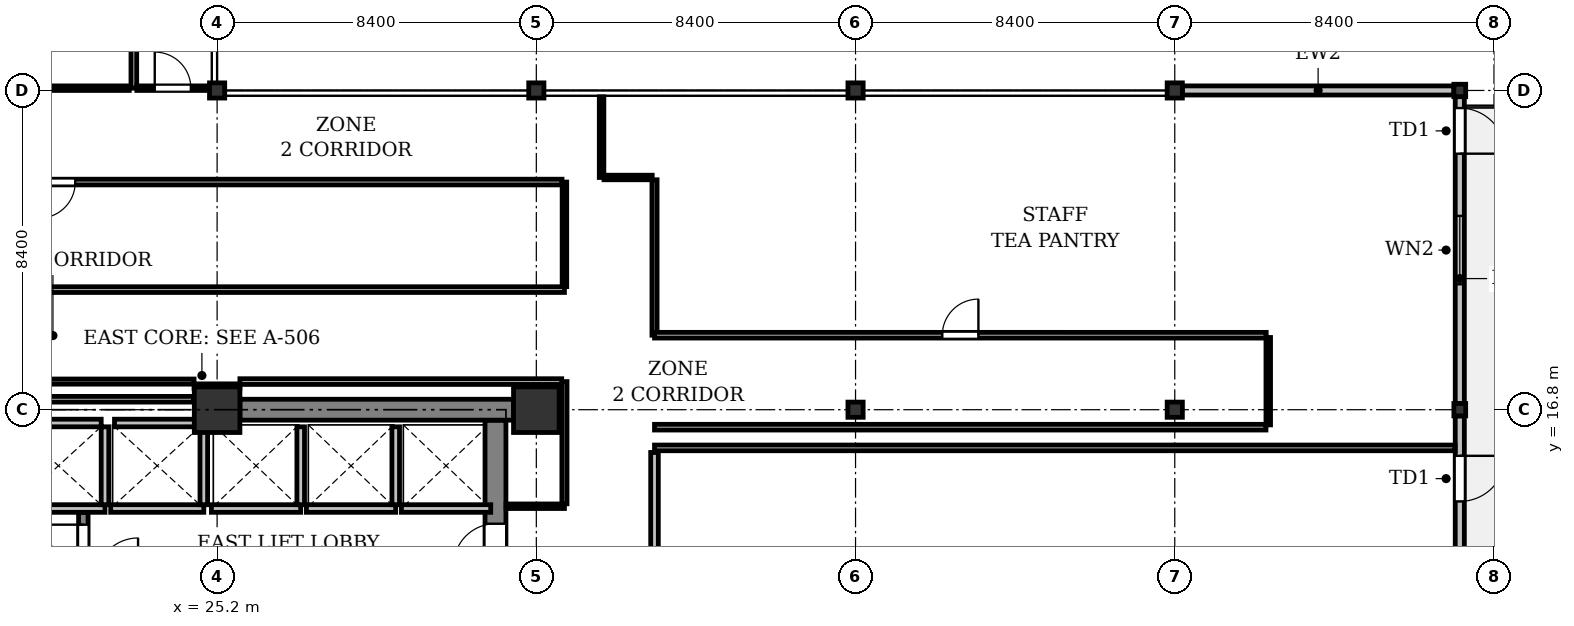
"""IFC4 building model, lengths in metres.
Left out: names, types, materials, properties, quantities, classifications, styles, units other than length and angle.
Written with IfcOpenShell. Run it as: python <this file> out.ifc"""

import sys

from ifc_helpers import new_model, si_unit, direction, frame, frame_2d, origin, origin_2d, place, context, subcontext, project, spatial, rectangle, i_section, extrude, element, fill, save


model = new_model("IFC4")
c1 = context("Model", 3, precision=1e-05, world=origin(), true_north=direction((0.0, 1.0)))
c2 = subcontext(c1, "Body", "Model", "MODEL_VIEW")
j1 = project(units=[si_unit("LENGTHUNIT", "METRE"), si_unit("PLANEANGLEUNIT", "RADIAN")], contexts=[c1])
p1 = place(None, origin())
s1 = spatial("IfcSite", under=j1, at=p1, CompositionType="ELEMENT")
p2 = place(p1, origin())
s2 = spatial("IfcBuilding", under=s1, at=p2, CompositionType="ELEMENT")
p3 = place(p2, frame((0.0, 0.0, 109.0)))
s3 = spatial("IfcBuildingStorey", under=s2, at=p3, CompositionType="ELEMENT", Elevation=109.0)
p4 = place(p3, frame((25.2, 16.8, 0.0), z_axis=(0.0, 0.0, 1.0), x_axis=(1.0, 0.0, 0.0)))
e1 = element("IfcColumn", 1, at=p4, inside=s3, PredefinedType="COLUMN", context=c2, shape_type="SweptSolid", body=[
    extrude(rectangle(XDim=1.2, YDim=1.2, at=origin_2d()), origin(), (0.0, 0.0, 1.0), 4.1),
])
p5 = place(p3, frame((25.2, 25.2, 0.0), z_axis=(0.0, 0.0, 1.0), x_axis=(1.0, 0.0, 0.0)))
e2 = element("IfcColumn", 2, at=p5, inside=s3, PredefinedType="COLUMN", context=c2, shape_type="SweptSolid", body=[
    extrude(i_section(OverallWidth=0.4, OverallDepth=0.4, WebThickness=0.025, FlangeThickness=0.04, at=origin_2d()), origin(), (0.0, 0.0, 1.0), 4.1),
])
p6 = place(p3, frame((33.6, 16.8, 0.0), z_axis=(0.0, 0.0, 1.0), x_axis=(1.0, 0.0, 0.0)))
e3 = element("IfcColumn", 3, at=p6, inside=s3, PredefinedType="COLUMN", context=c2, shape_type="SweptSolid", body=[
    extrude(rectangle(XDim=1.2, YDim=1.2, at=origin_2d()), origin(), (0.0, 0.0, 1.0), 4.1),
])
for number, where, z_axis, x_axis in (
    (4, (33.6, 25.2, 0.0), (0.0, 0.0, 1.0), (1.0, 0.0, 0.0)),
    (5, (42.0, 16.8, 0.0), (0.0, 0.0, 1.0), (1.0, 0.0, 0.0)),
    (6, (42.0, 25.2, 0.0), (0.0, 0.0, 1.0), (1.0, 0.0, 0.0)),
    (7, (50.4, 16.8, 0.0), (0.0, 0.0, 1.0), (1.0, 0.0, 0.0)),
    (8, (50.4, 25.2, 0.0), (0.0, 0.0, 1.0), (1.0, 0.0, 0.0)),
):
    element("IfcColumn", number, at=place(p3, frame(where, z_axis=z_axis, x_axis=x_axis)), inside=s3, PredefinedType="COLUMN", context=c2, shape_type="SweptSolid", body=[
        extrude(i_section(OverallWidth=0.4, OverallDepth=0.4, WebThickness=0.025, FlangeThickness=0.04, at=origin_2d()), origin(), (0.0, 0.0, 1.0), 4.1),
    ])
for number, where, z_axis, x_axis in (
    (9, (57.9, 16.8, 0.0), (0.0, 0.0, 1.0), (1.0, 0.0, 0.0)),
    (10, (57.9, 25.2, 0.0), (0.0, 0.0, 1.0), (1.0, 0.0, 0.0)),
):
    element("IfcColumn", number, at=place(p3, frame(where, z_axis=z_axis, x_axis=x_axis)), inside=s3, PredefinedType="COLUMN", context=c2, shape_type="SweptSolid", body=[
        extrude(i_section(OverallWidth=0.311, OverallDepth=0.327, WebThickness=0.016, FlangeThickness=0.025, FilletRadius=0.017, at=origin_2d()), origin(), (0.0, 0.0, 1.0), 4.1),
    ])
p7 = place(p3, frame((57.9, 25.037, 0.0), z_axis=(0.0, 0.0, 1.0), x_axis=(0.0, -1.0, 0.0)))
e11 = element("IfcWall", 11, at=p7, inside=s3, PredefinedType="STANDARD", context=c2, shape_type="SweptSolid", body=[
    extrude(rectangle(XDim=8.073, YDim=0.24, at=frame_2d((4.037, 0.0))), origin(), (0.0, 0.0, 1.0), 3.347),
])
p8 = place(p7, frame((0.3, 0.0, 0.0)))
e12 = element("IfcOpeningElement", 12, at=p8, cuts=e11, PredefinedType="OPENING", context=c2, shape_type="SweptSolid", body=[
    extrude(rectangle(XDim=1.2, YDim=2.2, at=frame_2d((0.6, 1.1))), frame((0.0, 0.13, 0.0), z_axis=(0.0, -1.0, 0.0), x_axis=(1.0, 0.0, 0.0)), (0.0, 0.0, 1.0), 0.26),
])
p9 = place(p7, frame((3.136, 0.0, 0.9)))
e13 = element("IfcOpeningElement", 13, at=p9, cuts=e11, PredefinedType="OPENING", context=c2, shape_type="SweptSolid", body=[
    extrude(rectangle(XDim=1.8, YDim=1.6, at=frame_2d((0.9, 0.8))), frame((0.0, 0.13, 0.0), z_axis=(0.0, -1.0, 0.0), x_axis=(1.0, 0.0, 0.0)), (0.0, 0.0, 1.0), 0.26),
])
p10 = place(p3, frame((57.9, 16.636, 0.0), z_axis=(0.0, 0.0, 1.0), x_axis=(0.0, -1.0, 0.0)))
e14 = element("IfcWall", 14, at=p10, inside=s3, PredefinedType="STANDARD", context=c2, shape_type="SweptSolid", body=[
    extrude(rectangle(XDim=8.073, YDim=0.24, at=frame_2d((4.037, 0.0))), origin(), (0.0, 0.0, 1.0), 3.347),
])
p11 = place(p10, frame((1.05, 0.0, 0.0)))
e15 = element("IfcOpeningElement", 15, at=p11, cuts=e14, PredefinedType="OPENING", context=c2, shape_type="SweptSolid", body=[
    extrude(rectangle(XDim=1.2, YDim=2.2, at=frame_2d((0.6, 1.1))), frame((0.0, 0.13, 0.0), z_axis=(0.0, -1.0, 0.0), x_axis=(1.0, 0.0, 0.0)), (0.0, 0.0, 1.0), 0.26),
])
p12 = place(p10, frame((3.722, 0.0, 0.9)))
e16 = element("IfcOpeningElement", 16, at=p12, cuts=e14, PredefinedType="OPENING", context=c2, shape_type="SweptSolid", body=[
    extrude(rectangle(XDim=1.5, YDim=1.6, at=frame_2d((0.75, 0.8))), frame((0.0, 0.13, 0.0), z_axis=(0.0, -1.0, 0.0), x_axis=(1.0, 0.0, 0.0)), (0.0, 0.0, 1.0), 0.26),
])
p13 = place(p3, frame((50.6, 25.2, 0.0), z_axis=(0.0, 0.0, 1.0), x_axis=(1.0, 0.0, 0.0)))
e17 = element("IfcWall", 17, at=p13, inside=s3, PredefinedType="STANDARD", context=c2, shape_type="SweptSolid", body=[
    extrude(rectangle(XDim=7.144, YDim=0.24, at=frame_2d((3.572, 0.0))), origin(), (0.0, 0.0, 1.0), 2.84),
])
p14 = place(p3, frame((32.525, 8.675, 0.0), z_axis=(0.0, 0.0, 1.0), x_axis=(0.0, 1.0, 0.0)))
e18 = element("IfcWall", 18, at=p14, inside=s3, PredefinedType="SHEAR", context=c2, shape_type="SweptSolid", body=[
    extrude(rectangle(XDim=7.85, YDim=0.55, at=frame_2d((3.925, 0.0))), origin(), (0.0, 0.0, 1.0), 3.75),
])
p15 = place(p14, frame((4.025, 0.0, 0.0)))
e19 = element("IfcOpeningElement", 19, at=p15, cuts=e18, PredefinedType="OPENING", context=c2, shape_type="SweptSolid", body=[
    extrude(rectangle(XDim=1.1, YDim=2.15, at=frame_2d((0.55, 1.075))), frame((0.0, 0.285, 0.0), z_axis=(0.0, -1.0, 0.0), x_axis=(1.0, 0.0, 0.0)), (0.0, 0.0, 1.0), 0.57),
])
p16 = place(p3, frame((25.8, 16.8, 0.0), z_axis=(0.0, 0.0, 1.0), x_axis=(1.0, 0.0, 0.0)))
e20 = element("IfcWall", 20, at=p16, inside=s3, PredefinedType="SHEAR", context=c2, shape_type="SweptSolid", body=[
    extrude(rectangle(XDim=7.2, YDim=0.55, at=frame_2d((3.6, 0.0))), origin(), (0.0, 0.0, 1.0), 3.75),
])
p17 = place(p3, frame((21.68, 12.45, 0.0), z_axis=(0.0, 0.0, 1.0), x_axis=(0.0, 1.0, 0.0)))
e21 = element("IfcWall", 21, at=p17, inside=s3, PredefinedType="SHEAR", context=c2, shape_type="SweptSolid", body=[
    extrude(rectangle(XDim=1.65, YDim=0.25, at=frame_2d((0.825, 0.0))), origin(), (0.0, 0.0, 1.0), 3.75),
])
p18 = place(p17, frame((0.325, 0.0, 0.0)))
e22 = element("IfcOpeningElement", 22, at=p18, cuts=e21, PredefinedType="OPENING", context=c2, shape_type="SweptSolid", body=[
    extrude(rectangle(XDim=1.0, YDim=2.15, at=frame_2d((0.5, 1.075))), frame((0.0, 0.135, 0.0), z_axis=(0.0, -1.0, 0.0), x_axis=(1.0, 0.0, 0.0)), (0.0, 0.0, 1.0), 0.27),
])
p19 = place(p3, frame((19.8, 14.2, 0.0), z_axis=(0.0, 0.0, 1.0), x_axis=(1.0, 0.0, 0.0)))
e23 = element("IfcWall", 23, at=p19, inside=s3, PredefinedType="PARTITIONING", context=c2, shape_type="SweptSolid", body=[
    extrude(rectangle(XDim=2.45, YDim=0.2, at=frame_2d((1.225, 0.0))), origin(), (0.0, 0.0, 1.0), 3.75),
])
p20 = place(p3, frame((22.25, 14.3, 0.0), z_axis=(0.0, 0.0, 1.0), x_axis=(0.0, 1.0, 0.0)))
e24 = element("IfcWall", 24, at=p20, inside=s3, PredefinedType="PARTITIONING", context=c2, shape_type="SweptSolid", body=[
    extrude(rectangle(XDim=2.05, YDim=0.2, at=frame_2d((1.025, 0.0))), origin(), (0.0, 0.0, 1.0), 3.75),
])
p21 = place(p3, frame((19.9, 16.45, 0.0), z_axis=(0.0, 0.0, 1.0), x_axis=(1.0, 0.0, 0.0)))
e25 = element("IfcWall", 25, at=p21, inside=s3, PredefinedType="PARTITIONING", context=c2, shape_type="SweptSolid", body=[
    extrude(rectangle(XDim=2.25, YDim=0.2, at=frame_2d((1.125, 0.0))), origin(), (0.0, 0.0, 1.0), 3.75),
])
p22 = place(p3, frame((22.4, 14.2, 0.0), z_axis=(0.0, 0.0, 1.0), x_axis=(1.0, 0.0, 0.0)))
e26 = element("IfcWall", 26, at=p22, inside=s3, PredefinedType="PARTITIONING", context=c2, shape_type="SweptSolid", body=[
    extrude(rectangle(XDim=2.45, YDim=0.2, at=frame_2d((1.225, 0.0))), origin(), (0.0, 0.0, 1.0), 3.75),
])
p23 = place(p3, frame((24.85, 14.3, 0.0), z_axis=(0.0, 0.0, 1.0), x_axis=(0.0, 1.0, 0.0)))
e27 = element("IfcWall", 27, at=p23, inside=s3, PredefinedType="PARTITIONING", context=c2, shape_type="SweptSolid", body=[
    extrude(rectangle(XDim=2.05, YDim=0.2, at=frame_2d((1.025, 0.0))), origin(), (0.0, 0.0, 1.0), 3.75),
])
p24 = place(p3, frame((22.5, 16.45, 0.0), z_axis=(0.0, 0.0, 1.0), x_axis=(1.0, 0.0, 0.0)))
e28 = element("IfcWall", 28, at=p24, inside=s3, PredefinedType="PARTITIONING", context=c2, shape_type="SweptSolid", body=[
    extrude(rectangle(XDim=2.25, YDim=0.2, at=frame_2d((1.125, 0.0))), origin(), (0.0, 0.0, 1.0), 3.75),
])
p25 = place(p3, frame((25.05, 14.2, 0.0), z_axis=(0.0, 0.0, 1.0), x_axis=(1.0, 0.0, 0.0)))
e29 = element("IfcWall", 29, at=p25, inside=s3, PredefinedType="PARTITIONING", context=c2, shape_type="SweptSolid", body=[
    extrude(rectangle(XDim=2.35, YDim=0.2, at=frame_2d((1.175, 0.0))), origin(), (0.0, 0.0, 1.0), 3.75),
])
p26 = place(p3, frame((27.4, 14.3, 0.0), z_axis=(0.0, 0.0, 1.0), x_axis=(0.0, 1.0, 0.0)))
e30 = element("IfcWall", 30, at=p26, inside=s3, PredefinedType="PARTITIONING", context=c2, shape_type="SweptSolid", body=[
    extrude(rectangle(XDim=2.05, YDim=0.2, at=frame_2d((1.025, 0.0))), origin(), (0.0, 0.0, 1.0), 3.75),
])
p27 = place(p3, frame((27.55, 14.2, 0.0), z_axis=(0.0, 0.0, 1.0), x_axis=(1.0, 0.0, 0.0)))
e31 = element("IfcWall", 31, at=p27, inside=s3, PredefinedType="PARTITIONING", context=c2, shape_type="SweptSolid", body=[
    extrude(rectangle(XDim=2.35, YDim=0.2, at=frame_2d((1.175, 0.0))), origin(), (0.0, 0.0, 1.0), 3.75),
])
p28 = place(p3, frame((29.9, 14.3, 0.0), z_axis=(0.0, 0.0, 1.0), x_axis=(0.0, 1.0, 0.0)))
e32 = element("IfcWall", 32, at=p28, inside=s3, PredefinedType="PARTITIONING", context=c2, shape_type="SweptSolid", body=[
    extrude(rectangle(XDim=2.05, YDim=0.2, at=frame_2d((1.025, 0.0))), origin(), (0.0, 0.0, 1.0), 3.75),
])
p29 = place(p3, frame((30.05, 14.2, 0.0), z_axis=(0.0, 0.0, 1.0), x_axis=(1.0, 0.0, 0.0)))
e33 = element("IfcWall", 33, at=p29, inside=s3, PredefinedType="PARTITIONING", context=c2, shape_type="SweptSolid", body=[
    extrude(rectangle(XDim=2.35, YDim=0.2, at=frame_2d((1.175, 0.0))), origin(), (0.0, 0.0, 1.0), 3.75),
])
p30 = place(p3, frame((23.009, 46.031, 0.0), z_axis=(0.0, 0.0, 1.0), x_axis=(0.0, -1.0, 0.0)))
e34 = element("IfcWall", 34, at=p30, inside=s3, PredefinedType="PARTITIONING", context=c2, shape_type="SweptSolid", body=[
    extrude(rectangle(XDim=20.771, YDim=0.15, at=frame_2d((10.385, 0.0))), origin(), (0.0, 0.0, 1.0), 3.217),
])
p31 = place(p3, frame((23.088, 25.26, 0.0), z_axis=(0.0, 0.0, 1.0), x_axis=(1.0, 0.0, 0.0)))
e35 = element("IfcWall", 35, at=p31, inside=s3, PredefinedType="PARTITIONING", context=c2, shape_type="SweptSolid", body=[
    extrude(rectangle(XDim=1.892, YDim=0.12, at=frame_2d((0.946, 0.0))), origin(), (0.0, 0.0, 1.0), 3.217),
])
p32 = place(p31, frame((0.471, 0.0, 0.0)))
e36 = element("IfcOpeningElement", 36, at=p32, cuts=e35, PredefinedType="OPENING", context=c2, shape_type="SweptSolid", body=[
    extrude(rectangle(XDim=0.95, YDim=2.15, at=frame_2d((0.475, 1.075))), frame((0.0, 0.07, 0.0), z_axis=(0.0, -1.0, 0.0), x_axis=(1.0, 0.0, 0.0)), (0.0, 0.0, 1.0), 0.14),
])
p33 = place(p3, frame((52.8, 16.34, 0.0), z_axis=(0.0, 0.0, 1.0), x_axis=(-1.0, 0.0, 0.0)))
e37 = element("IfcWall", 37, at=p33, inside=s3, PredefinedType="PARTITIONING", context=c2, shape_type="SweptSolid", body=[
    extrude(rectangle(XDim=16.09, YDim=0.15, at=frame_2d((8.045, 0.0))), origin(), (0.0, 0.0, 1.0), 3.222),
])
p34 = place(p3, frame((36.71, 15.795, 0.0), z_axis=(0.0, 0.0, 1.0), x_axis=(1.0, 0.0, 0.0)))
e38 = element("IfcWall", 38, at=p34, inside=s3, PredefinedType="PARTITIONING", context=c2, shape_type="SweptSolid", body=[
    extrude(rectangle(XDim=21.066, YDim=0.15, at=frame_2d((10.533, 0.0))), origin(), (0.0, 0.0, 1.0), 3.222),
])
p35 = place(p3, frame((35.317, 25.031, 0.0), z_axis=(0.0, 0.0, 1.0), x_axis=(0.0, -1.0, 0.0)))
e39 = element("IfcWall", 39, at=p35, inside=s3, PredefinedType="PARTITIONING", context=c2, shape_type="SweptSolid", body=[
    extrude(rectangle(XDim=2.121, YDim=0.12, at=frame_2d((1.061, 0.0))), origin(), (0.0, 0.0, 1.0), 3.75),
])
p36 = place(p3, frame((35.381, 22.91, 0.0), z_axis=(0.0, 0.0, 1.0), x_axis=(1.0, 0.0, 0.0)))
e40 = element("IfcWall", 40, at=p36, inside=s3, PredefinedType="PARTITIONING", context=c2, shape_type="SweptSolid", body=[
    extrude(rectangle(XDim=1.269, YDim=0.12, at=frame_2d((0.634, 0.0))), origin(), (0.0, 0.0, 1.0), 3.75),
])
p37 = place(p3, frame((36.71, 22.85, 0.0), z_axis=(0.0, 0.0, 1.0), x_axis=(0.0, -1.0, 0.0)))
e41 = element("IfcWall", 41, at=p37, inside=s3, PredefinedType="PARTITIONING", context=c2, shape_type="SweptSolid", body=[
    extrude(rectangle(XDim=4.09, YDim=0.135, at=frame_2d((2.045, 0.0))), origin(), (0.0, 0.0, 1.0), 3.75),
])
p38 = place(p3, frame((36.71, 18.76, 0.0), z_axis=(0.0, 0.0, 1.0), x_axis=(0.999999999885, -1.5167832e-05, 0.0)))
e42 = element("IfcWall", 42, at=p38, inside=s3, PredefinedType="PARTITIONING", context=c2, shape_type="SweptSolid", body=[
    extrude(rectangle(XDim=16.096, YDim=0.15, at=frame_2d((8.048, 0.0))), origin(), (0.0, 0.0, 1.0), 3.222),
])
p39 = place(p38, frame((7.573, 0.0, 0.0)))
e43 = element("IfcOpeningElement", 43, at=p39, cuts=e42, PredefinedType="OPENING", context=c2, shape_type="SweptSolid", body=[
    extrude(rectangle(XDim=0.95, YDim=2.15, at=frame_2d((0.475, 1.075))), frame((0.0, 0.085, 0.0), z_axis=(0.0, -1.0, 0.0), x_axis=(1.0, 0.0, 0.0)), (0.0, 0.0, 1.0), 0.17),
])
p40 = place(p3, frame((52.86, 18.7, 0.0), z_axis=(0.0, 0.0, 1.0), x_axis=(0.0, -1.0, 0.0)))
e44 = element("IfcWall", 44, at=p40, inside=s3, PredefinedType="PARTITIONING", context=c2, shape_type="SweptSolid", body=[
    extrude(rectangle(XDim=2.3, YDim=0.12, at=frame_2d((1.15, 0.0))), origin(), (0.0, 0.0, 1.0), 2.84),
])
p41 = place(p3, frame((17.42, 17.075, 0.0), z_axis=(0.0, 0.0, 1.0), x_axis=(1.0, 0.0, 0.0)))
e45 = element("IfcWall", 45, at=p41, inside=s3, PredefinedType="PARTITIONING", context=c2, shape_type="SweptSolid", body=[
    extrude(rectangle(XDim=7.16, YDim=0.15, at=frame_2d((3.58, 0.0))), origin(), (0.0, 0.0, 1.0), 3.394),
])
p42 = place(p3, frame((24.594, 17.419, 0.0), z_axis=(0.0, 0.0, 1.0), x_axis=(0.999999815526, 0.000607410295, 0.0)))
e46 = element("IfcWall", 46, at=p42, inside=s3, PredefinedType="PARTITIONING", context=c2, shape_type="SweptSolid", body=[
    extrude(rectangle(XDim=1.206, YDim=0.12, at=frame_2d((0.603, 0.0))), origin(), (0.0, 0.0, 1.0), 3.222),
])
p43 = place(p3, frame((32.804, 14.26, 0.0), z_axis=(0.0, 0.0, 1.0), x_axis=(1.0, 0.0, 0.0)))
e47 = element("IfcWall", 47, at=p43, inside=s3, PredefinedType="PARTITIONING", context=c2, shape_type="SweptSolid", body=[
    extrude(rectangle(XDim=1.536, YDim=0.12, at=frame_2d((0.768, 0.0))), origin(), (0.0, 0.0, 1.0), 3.222),
])
p44 = place(p3, frame((34.34, 14.324, 0.0), z_axis=(0.0, 0.0, 1.0), x_axis=(0.0, 1.0, 0.0)))
e48 = element("IfcWall", 48, at=p44, inside=s3, PredefinedType="PARTITIONING", context=c2, shape_type="SweptSolid", body=[
    extrude(rectangle(XDim=3.216, YDim=0.135, at=frame_2d((1.608, 0.0))), origin(), (0.0, 0.0, 1.0), 3.217),
])
p45 = place(p3, frame((34.269, 17.54, 0.0), z_axis=(0.0, 0.0, 1.0), x_axis=(-1.0, 0.0, 0.0)))
e49 = element("IfcWall", 49, at=p45, inside=s3, PredefinedType="PARTITIONING", context=c2, shape_type="SweptSolid", body=[
    extrude(rectangle(XDim=8.469, YDim=0.15, at=frame_2d((4.234, 0.0))), origin(), (0.0, 0.0, 1.0), 3.222),
])
p46 = place(p3, frame((24.594, 17.54, 0.0), z_axis=(0.0, 0.0, 1.0), x_axis=(-1.0, 0.0, 0.0)))
e50 = element("IfcWall", 50, at=p46, inside=s3, PredefinedType="PARTITIONING", context=c2, shape_type="SweptSolid", body=[
    extrude(rectangle(XDim=4.694, YDim=0.135, at=frame_2d((2.347, 0.0))), origin(), (0.0, 0.0, 1.0), 3.394),
])
p47 = place(p3, frame((19.9, 19.96, 0.0), z_axis=(0.0, 0.0, 1.0), x_axis=(1.0, 0.0, 0.0)))
e51 = element("IfcWall", 51, at=p47, inside=s3, PredefinedType="PARTITIONING", context=c2, shape_type="SweptSolid", body=[
    extrude(rectangle(XDim=14.44, YDim=0.15, at=frame_2d((7.22, 0.0))), origin(), (0.0, 0.0, 1.0), 3.222),
])
p48 = place(p3, frame((34.34, 20.039, 0.0), z_axis=(0.0, 0.0, 1.0), x_axis=(0.0, 1.0, 0.0)))
e52 = element("IfcWall", 52, at=p48, inside=s3, PredefinedType="PARTITIONING", context=c2, shape_type="SweptSolid", body=[
    extrude(rectangle(XDim=2.751, YDim=0.12, at=frame_2d((1.375, 0.0))), origin(), (0.0, 0.0, 1.0), 3.75),
])
p49 = place(p3, frame((34.276, 22.79, 0.0), z_axis=(0.0, 0.0, 1.0), x_axis=(-1.0, 0.0, 0.0)))
e53 = element("IfcWall", 53, at=p49, inside=s3, PredefinedType="PARTITIONING", context=c2, shape_type="SweptSolid", body=[
    extrude(rectangle(XDim=26.566, YDim=0.15, at=frame_2d((13.283, 0.0))), origin(), (0.0, 0.0, 1.0), 3.222),
])
p50 = place(p49, frame((12.808, 0.0, 0.0)))
e54 = element("IfcOpeningElement", 54, at=p50, cuts=e53, PredefinedType="OPENING", context=c2, shape_type="SweptSolid", body=[
    extrude(rectangle(XDim=0.95, YDim=2.15, at=frame_2d((0.475, 1.075))), frame((0.0, 0.085, 0.0), z_axis=(0.0, -1.0, 0.0), x_axis=(1.0, 0.0, 0.0)), (0.0, 0.0, 1.0), 0.17),
])
p51 = place(p3, frame((36.71, 15.675, 0.0), z_axis=(0.0, 0.0, 1.0), x_axis=(0.0, -1.0, 0.0)))
e55 = element("IfcWall", 55, at=p51, inside=s3, PredefinedType="PARTITIONING", context=c2, shape_type="SweptSolid", body=[
    extrude(rectangle(XDim=7.965, YDim=0.2, at=frame_2d((3.982, 0.0))), origin(), (0.0, 0.0, 1.0), 3.217),
])
p52 = place(p51, frame((3.483, 0.0, 0.0)))
e56 = element("IfcOpeningElement", 56, at=p52, cuts=e55, PredefinedType="OPENING", context=c2, shape_type="SweptSolid", body=[
    extrude(rectangle(XDim=1.0, YDim=2.15, at=frame_2d((0.5, 1.075))), frame((0.0, 0.11, 0.0), z_axis=(0.0, -1.0, 0.0), x_axis=(1.0, 0.0, 0.0)), (0.0, 0.0, 1.0), 0.22),
])
p53 = place(p3, frame((20.039, 25.26, 0.0), z_axis=(0.0, 0.0, 1.0), x_axis=(1.0, 0.0, 0.0)))
e57 = element("IfcWall", 57, at=p53, inside=s3, PredefinedType="PARTITIONING", context=c2, shape_type="SweptSolid", body=[
    extrude(rectangle(XDim=2.85, YDim=0.12, at=frame_2d((1.425, 0.0))), origin(), (0.0, 0.0, 1.0), 3.217),
])
p54 = place(p8, origin())
e58 = element("IfcDoor", 58, at=p54, inside=s3, OperationType="SINGLE_SWING_RIGHT", PredefinedType="DOOR", context=c2, shape_type="SweptSolid", body=[
    extrude(rectangle(XDim=1.2, YDim=2.2, at=frame_2d((0.6, 1.1))), frame((0.0, 0.025, 0.0), z_axis=(0.0, -1.0, 0.0), x_axis=(1.0, 0.0, 0.0)), (0.0, 0.0, 1.0), 0.05),
])
fill(e12, e58)
p55 = place(p9, origin())
e59 = element("IfcWindow", 59, at=p55, inside=s3, PartitioningType="SINGLE_PANEL", PredefinedType="WINDOW", context=c2, shape_type="SweptSolid", body=[
    extrude(rectangle(XDim=1.8, YDim=1.6, at=frame_2d((0.9, 0.8))), frame((0.0, 0.03, 0.0), z_axis=(0.0, -1.0, 0.0), x_axis=(1.0, 0.0, 0.0)), (0.0, 0.0, 1.0), 0.06),
])
fill(e13, e59)
p56 = place(p11, origin())
e60 = element("IfcDoor", 60, at=p56, inside=s3, OperationType="SINGLE_SWING_LEFT", PredefinedType="DOOR", context=c2, shape_type="SweptSolid", body=[
    extrude(rectangle(XDim=1.2, YDim=2.2, at=frame_2d((0.6, 1.1))), frame((0.0, 0.025, 0.0), z_axis=(0.0, -1.0, 0.0), x_axis=(1.0, 0.0, 0.0)), (0.0, 0.0, 1.0), 0.05),
])
fill(e15, e60)
p57 = place(p15, origin())
e61 = element("IfcDoor", 61, at=p57, inside=s3, OperationType="SINGLE_SWING_LEFT", PredefinedType="DOOR", context=c2, shape_type="SweptSolid", body=[
    extrude(rectangle(XDim=1.1, YDim=2.15, at=frame_2d((0.55, 1.075))), frame((0.0, 0.025, 0.0), z_axis=(0.0, -1.0, 0.0), x_axis=(1.0, 0.0, 0.0)), (0.0, 0.0, 1.0), 0.05),
])
fill(e19, e61)
p58 = place(p18, origin())
e62 = element("IfcDoor", 62, at=p58, inside=s3, OperationType="SINGLE_SWING_RIGHT", PredefinedType="DOOR", context=c2, shape_type="SweptSolid", body=[
    extrude(rectangle(XDim=1.0, YDim=2.15, at=frame_2d((0.5, 1.075))), frame((0.0, 0.025, 0.0), z_axis=(0.0, -1.0, 0.0), x_axis=(1.0, 0.0, 0.0)), (0.0, 0.0, 1.0), 0.05),
])
fill(e22, e62)
p59 = place(p32, origin())
e63 = element("IfcDoor", 63, at=p59, inside=s3, OperationType="SINGLE_SWING_LEFT", PredefinedType="DOOR", context=c2, shape_type="SweptSolid", body=[
    extrude(rectangle(XDim=0.95, YDim=2.15, at=frame_2d((0.475, 1.075))), frame((0.0, 0.025, 0.0), z_axis=(0.0, -1.0, 0.0), x_axis=(1.0, 0.0, 0.0)), (0.0, 0.0, 1.0), 0.05),
])
fill(e36, e63)
p60 = place(p39, origin())
e64 = element("IfcDoor", 64, at=p60, inside=s3, OperationType="SINGLE_SWING_RIGHT", PredefinedType="DOOR", context=c2, shape_type="SweptSolid", body=[
    extrude(rectangle(XDim=0.95, YDim=2.15, at=frame_2d((0.475, 1.075))), frame((0.0, 0.025, 0.0), z_axis=(0.0, -1.0, 0.0), x_axis=(1.0, 0.0, 0.0)), (0.0, 0.0, 1.0), 0.05),
])
fill(e43, e64)
p61 = place(p50, origin())
e65 = element("IfcDoor", 65, at=p61, inside=s3, OperationType="SINGLE_SWING_RIGHT", PredefinedType="DOOR", context=c2, shape_type="SweptSolid", body=[
    extrude(rectangle(XDim=0.95, YDim=2.15, at=frame_2d((0.475, 1.075))), frame((0.0, 0.025, 0.0), z_axis=(0.0, -1.0, 0.0), x_axis=(1.0, 0.0, 0.0)), (0.0, 0.0, 1.0), 0.05),
])
fill(e54, e65)
save(model, sys.argv[1])
